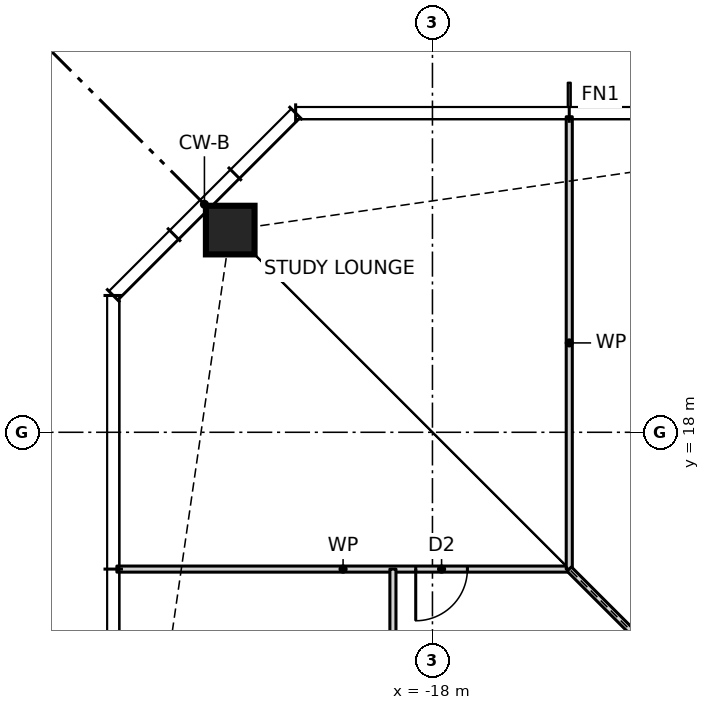
"""IFC4 building model, lengths in metres.
Left out: names, types, materials, properties, quantities, classifications, styles, units other than length and angle.
Written with IfcOpenShell. Run it as: python <this file> out.ifc"""

import sys

from ifc_helpers import new_model, si_unit, direction, frame, frame_2d, origin, origin_2d, place, context, subcontext, project, spatial, rectangle, hollow_rectangle, extrude, element, fill, save


model = new_model("IFC4")
c1 = context("Model", 3, precision=1e-05, world=origin(), true_north=direction((0.0, 1.0)))
c2 = subcontext(c1, "Body", "Model", "MODEL_VIEW")
j1 = project(units=[si_unit("LENGTHUNIT", "METRE"), si_unit("PLANEANGLEUNIT", "RADIAN")], contexts=[c1])
p1 = place(None, origin())
s1 = spatial("IfcSite", under=j1, at=p1, CompositionType="ELEMENT")
p2 = place(p1, origin())
s2 = spatial("IfcBuilding", under=s1, at=p2, CompositionType="ELEMENT")
p3 = place(p2, frame((0.0, 0.0, 50.0)))
s3 = spatial("IfcBuildingStorey", under=s2, at=p3, CompositionType="ELEMENT", Elevation=50.0)
p4 = place(p3, frame((-21.326, 21.326, 0.0), z_axis=(0.0, 0.0, 1.0), x_axis=(1.0, 0.0, 0.0)))
e1 = element("IfcColumn", 1, at=p4, inside=s3, PredefinedType="COLUMN", context=c2, shape_type="SweptSolid", body=[
    extrude(hollow_rectangle(XDim=0.8, YDim=0.8, WallThickness=0.09, at=origin_2d()), origin(), (0.0, 0.0, 1.0), 3.5),
])
p5 = place(p3, frame((-23.19, 15.75, 0.0), z_axis=(0.0, 0.0, 1.0), x_axis=(1.0, 0.0, 0.0)))
e2 = element("IfcWall", 2, at=p5, inside=s3, PredefinedType="PARTITIONING", context=c2, shape_type="SweptSolid", body=[
    extrude(rectangle(XDim=7.44, YDim=0.1, at=frame_2d((3.72, 0.0))), origin(), (0.0, 0.0, 1.0), 3.27),
])
p6 = place(p5, frame((4.915, 0.0, 0.0)))
e3 = element("IfcOpeningElement", 3, at=p6, cuts=e2, PredefinedType="OPENING", context=c2, shape_type="SweptSolid", body=[
    extrude(rectangle(XDim=0.85, YDim=2.1, at=frame_2d((0.425, 1.05))), frame((0.0, 0.06, 0.0), z_axis=(0.0, -1.0, 0.0), x_axis=(1.0, 0.0, 0.0)), (0.0, 0.0, 1.0), 0.12),
])
p7 = place(p3, frame((-15.75, 15.75, 0.0), z_axis=(0.0, 0.0, 1.0), x_axis=(0.0, 1.0, 0.0)))
e4 = element("IfcWall", 4, at=p7, inside=s3, PredefinedType="PARTITIONING", context=c2, shape_type="SweptSolid", body=[
    extrude(rectangle(XDim=7.44, YDim=0.1, at=frame_2d((3.72, 0.0))), origin(), (0.0, 0.0, 1.0), 3.27),
])
p8 = place(p3, frame((-18.65, -11.25, 0.0), z_axis=(0.0, 0.0, 1.0), x_axis=(0.0, 1.0, 0.0)))
e5 = element("IfcWall", 5, at=p8, inside=s3, PredefinedType="PARTITIONING", context=c2, shape_type="SweptSolid", body=[
    extrude(rectangle(XDim=27.0, YDim=0.1, at=frame_2d((13.5, 0.0))), origin(), (0.0, 0.0, 1.0), 3.27),
])
p9 = place(p8, frame((24.3, 0.0, 0.0)))
e6 = element("IfcOpeningElement", 6, at=p9, cuts=e5, PredefinedType="OPENING", context=c2, shape_type="SweptSolid", body=[
    extrude(rectangle(XDim=0.9, YDim=2.1, at=frame_2d((0.45, 1.05))), frame((0.0, 0.06, 0.0), z_axis=(0.0, -1.0, 0.0), x_axis=(1.0, 0.0, 0.0)), (0.0, 0.0, 1.0), 0.12),
])
p10 = place(p8, frame((19.8, 0.0, 0.0)))
e7 = element("IfcOpeningElement", 7, at=p10, cuts=e5, PredefinedType="OPENING", context=c2, shape_type="SweptSolid", body=[
    extrude(rectangle(XDim=0.9, YDim=2.1, at=frame_2d((0.45, 1.05))), frame((0.0, 0.06, 0.0), z_axis=(0.0, -1.0, 0.0), x_axis=(1.0, 0.0, 0.0)), (0.0, 0.0, 1.0), 0.12),
])
p11 = place(p8, frame((15.3, 0.0, 0.0)))
e8 = element("IfcOpeningElement", 8, at=p11, cuts=e5, PredefinedType="OPENING", context=c2, shape_type="SweptSolid", body=[
    extrude(rectangle(XDim=0.9, YDim=2.1, at=frame_2d((0.45, 1.05))), frame((0.0, 0.06, 0.0), z_axis=(0.0, -1.0, 0.0), x_axis=(1.0, 0.0, 0.0)), (0.0, 0.0, 1.0), 0.12),
])
p12 = place(p8, frame((10.8, 0.0, 0.0)))
e9 = element("IfcOpeningElement", 9, at=p12, cuts=e5, PredefinedType="OPENING", context=c2, shape_type="SweptSolid", body=[
    extrude(rectangle(XDim=0.9, YDim=2.1, at=frame_2d((0.45, 1.05))), frame((0.0, 0.06, 0.0), z_axis=(0.0, -1.0, 0.0), x_axis=(1.0, 0.0, 0.0)), (0.0, 0.0, 1.0), 0.12),
])
p13 = place(p8, frame((6.3, 0.0, 0.0)))
e10 = element("IfcOpeningElement", 10, at=p13, cuts=e5, PredefinedType="OPENING", context=c2, shape_type="SweptSolid", body=[
    extrude(rectangle(XDim=0.9, YDim=2.1, at=frame_2d((0.45, 1.05))), frame((0.0, 0.06, 0.0), z_axis=(0.0, -1.0, 0.0), x_axis=(1.0, 0.0, 0.0)), (0.0, 0.0, 1.0), 0.12),
])
p14 = place(p8, frame((1.8, 0.0, 0.0)))
e11 = element("IfcOpeningElement", 11, at=p14, cuts=e5, PredefinedType="OPENING", context=c2, shape_type="SweptSolid", body=[
    extrude(rectangle(XDim=0.9, YDim=2.1, at=frame_2d((0.45, 1.05))), frame((0.0, 0.06, 0.0), z_axis=(0.0, -1.0, 0.0), x_axis=(1.0, 0.0, 0.0)), (0.0, 0.0, 1.0), 0.12),
])
p15 = place(p3, frame((-11.6, 11.6, 0.0), z_axis=(0.0, 0.0, 1.0), x_axis=(-0.707106781187, 0.707106781187, 0.0)))
e12 = element("IfcWall", 12, at=p15, inside=s3, PredefinedType="PARTITIONING", context=c2, shape_type="SweptSolid", body=[
    extrude(rectangle(XDim=5.869, YDim=0.1, at=frame_2d((2.935, 0.0))), origin(), (0.0, 0.0, 1.0), 2.343),
])
p16 = place(p6, frame((0.85, 0.0, 0.0), z_axis=(0.0, 0.0, 1.0), x_axis=(-1.0, 0.0, 0.0)))
e13 = element("IfcDoor", 13, at=p16, inside=s3, OperationType="SINGLE_SWING_RIGHT", PredefinedType="DOOR", context=c2, shape_type="SweptSolid", body=[
    extrude(rectangle(XDim=0.85, YDim=2.1, at=frame_2d((0.425, 1.05))), frame((0.0, 0.025, 0.0), z_axis=(0.0, -1.0, 0.0), x_axis=(1.0, 0.0, 0.0)), (0.0, 0.0, 1.0), 0.05),
])
fill(e3, e13)
save(model, sys.argv[1])
